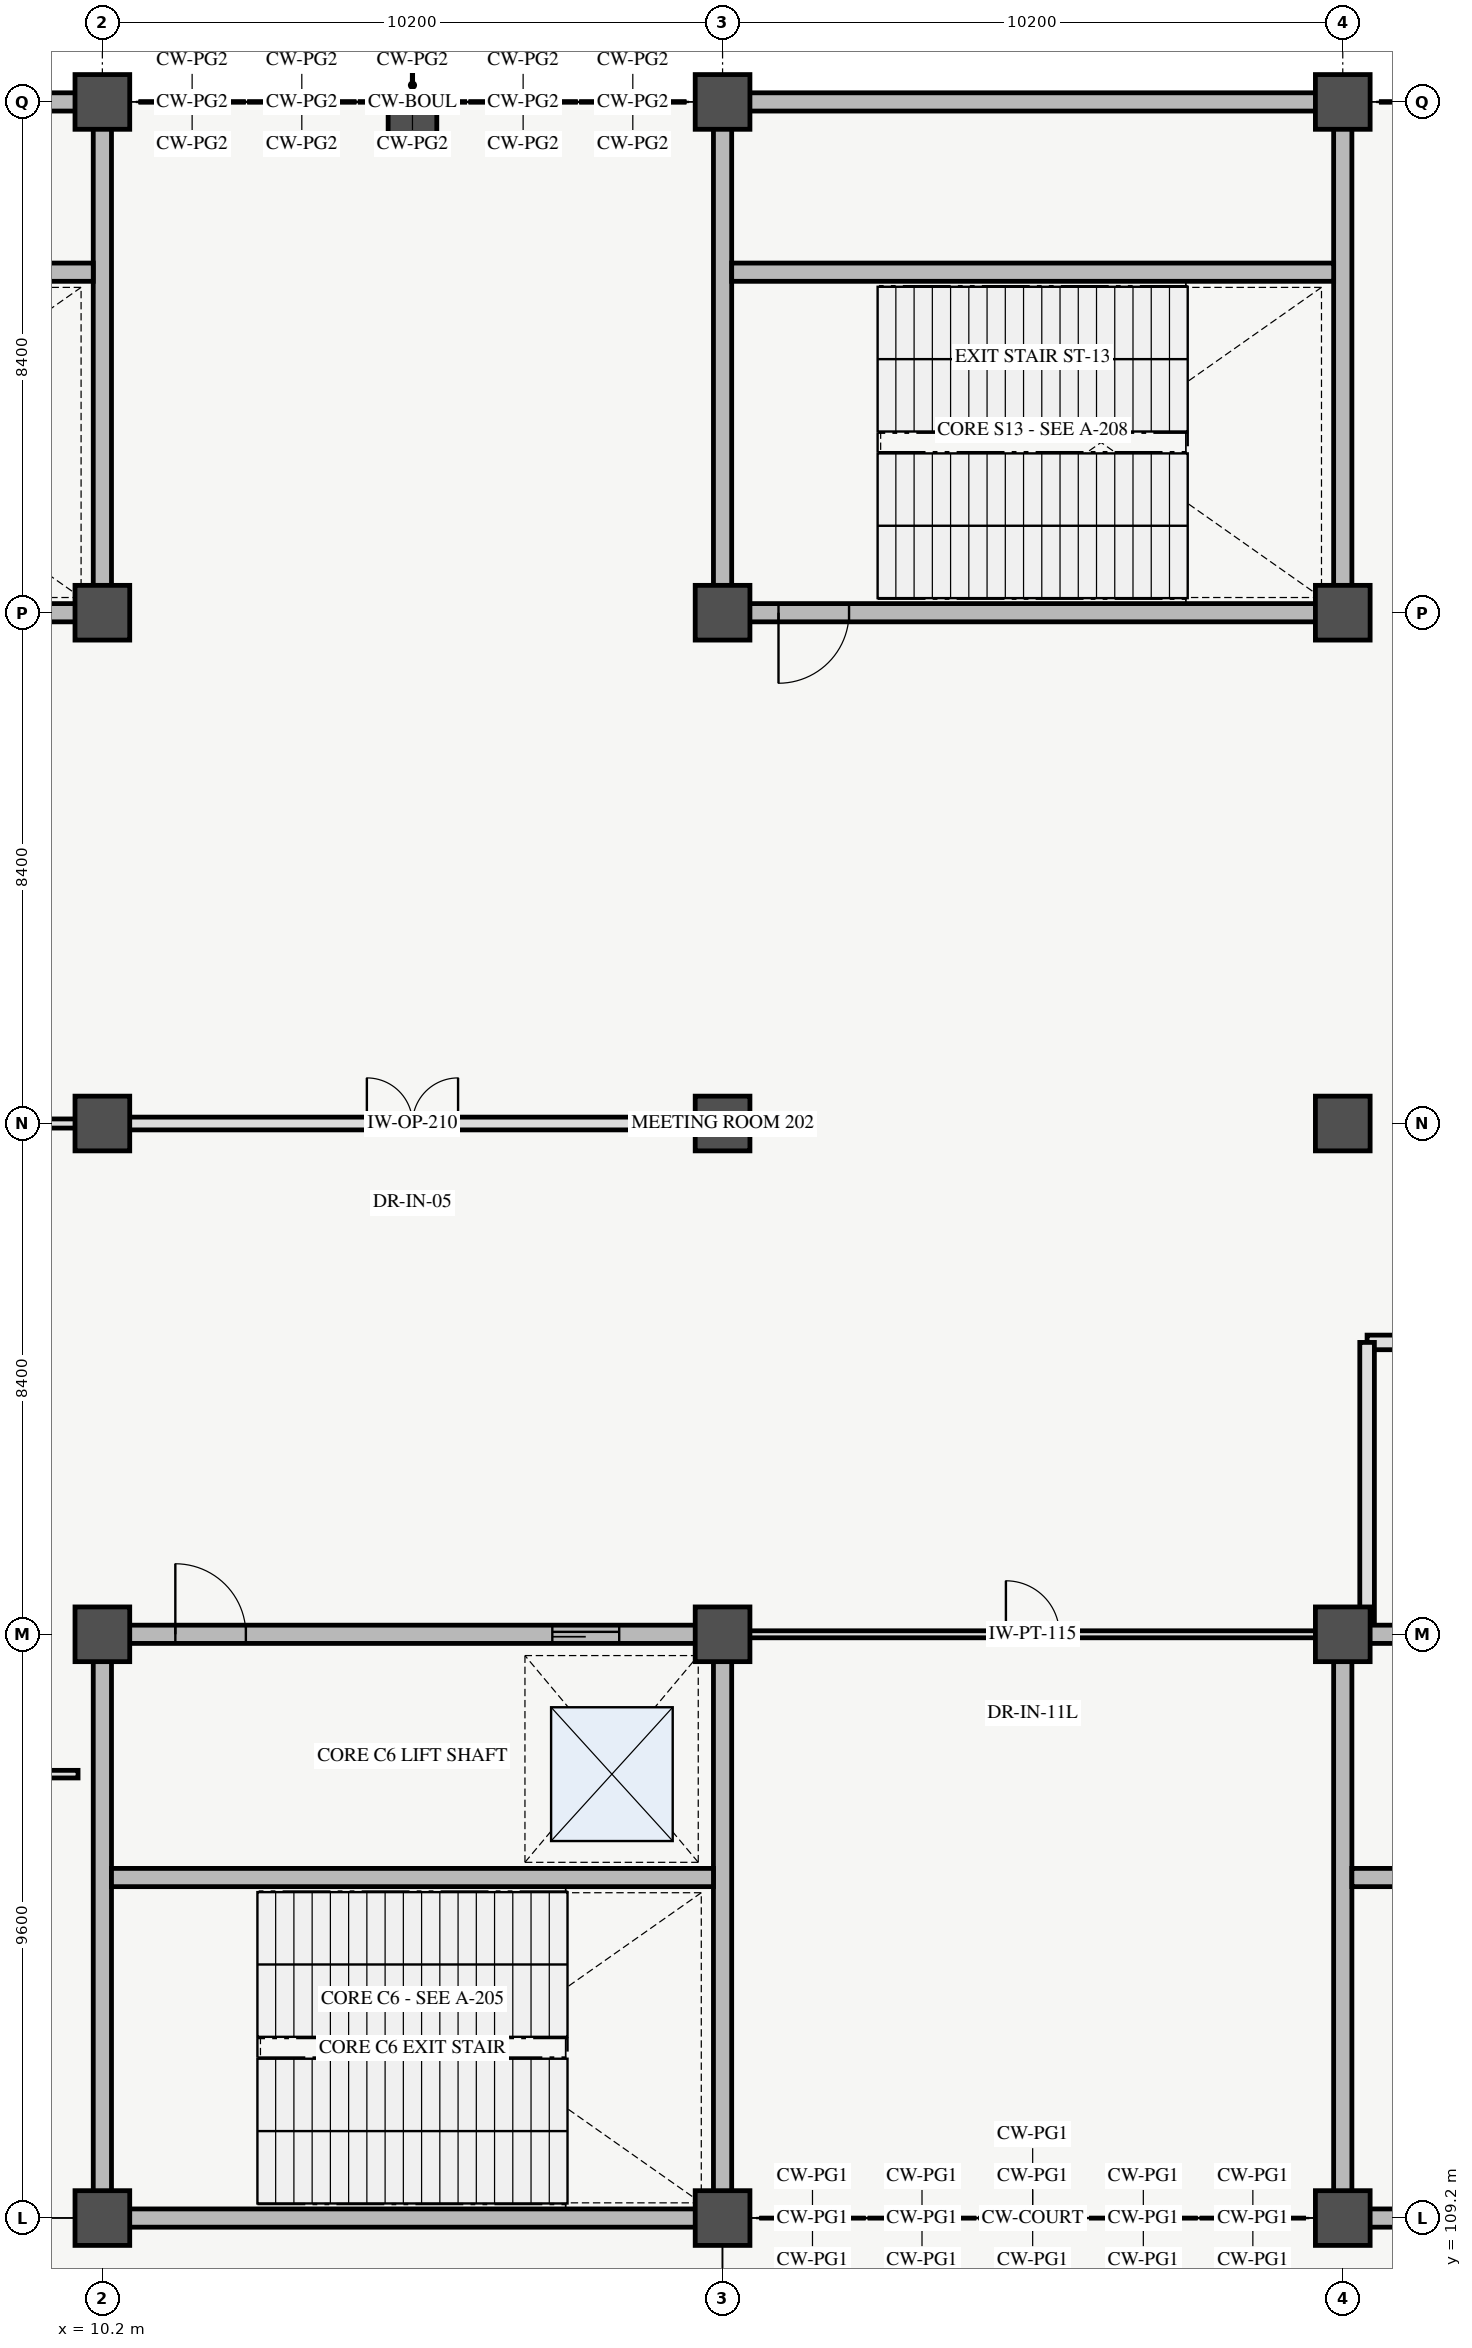
"""IFC4 building model, lengths in metres.
Left out: names, types, materials, properties, quantities, classifications, styles, units other than length and angle.
Written with IfcOpenShell. Run it as: python <this file> out.ifc"""

import sys

from ifc_helpers import new_model, si_unit, direction, frame, frame_2d, origin, origin_2d, place, context, subcontext, project, spatial, rectangle, extrude, element, fill, save


model = new_model("IFC4")
c1 = context("Model", 3, precision=1e-05, world=origin(), true_north=direction((0.0, 1.0)))
c2 = subcontext(c1, "Body", "Model", "MODEL_VIEW")
j1 = project(units=[si_unit("LENGTHUNIT", "METRE"), si_unit("PLANEANGLEUNIT", "RADIAN")], contexts=[c1])
p1 = place(None, origin())
s1 = spatial("IfcSite", under=j1, at=p1, CompositionType="ELEMENT")
p2 = place(p1, origin())
s2 = spatial("IfcBuilding", under=s1, at=p2, CompositionType="ELEMENT")
p3 = place(p2, frame((0.0, 0.0, 5.4)))
s3 = spatial("IfcBuildingStorey", under=s2, at=p3, CompositionType="ELEMENT", Elevation=5.4)
for number, where, z_axis, x_axis in (
    (1, (10.2, 109.2, 0.0), (0.0, 0.0, 1.0), (1.0, 0.0, 0.0)),
    (2, (10.2, 118.8, 0.0), (0.0, 0.0, 1.0), (1.0, 0.0, 0.0)),
    (3, (10.2, 127.2, 0.0), (0.0, 0.0, 1.0), (1.0, 0.0, 0.0)),
    (4, (10.2, 135.6, 0.0), (0.0, 0.0, 1.0), (1.0, 0.0, 0.0)),
    (5, (10.2, 144.0, 0.0), (0.0, 0.0, 1.0), (1.0, 0.0, 0.0)),
    (6, (20.4, 109.2, 0.0), (0.0, 0.0, 1.0), (1.0, 0.0, 0.0)),
    (7, (20.4, 118.8, 0.0), (0.0, 0.0, 1.0), (1.0, 0.0, 0.0)),
    (8, (20.4, 127.2, 0.0), (0.0, 0.0, 1.0), (1.0, 0.0, 0.0)),
    (9, (20.4, 135.6, 0.0), (0.0, 0.0, 1.0), (1.0, 0.0, 0.0)),
    (10, (20.4, 144.0, 0.0), (0.0, 0.0, 1.0), (1.0, 0.0, 0.0)),
    (11, (30.6, 109.2, 0.0), (0.0, 0.0, 1.0), (1.0, 0.0, 0.0)),
    (12, (30.6, 118.8, 0.0), (0.0, 0.0, 1.0), (1.0, 0.0, 0.0)),
    (13, (30.6, 127.2, 0.0), (0.0, 0.0, 1.0), (1.0, 0.0, 0.0)),
    (14, (30.6, 135.6, 0.0), (0.0, 0.0, 1.0), (1.0, 0.0, 0.0)),
    (15, (30.6, 144.0, 0.0), (0.0, 0.0, 1.0), (1.0, 0.0, 0.0)),
):
    element("IfcColumn", number, at=place(p3, frame(where, z_axis=z_axis, x_axis=x_axis)), inside=s3, PredefinedType="COLUMN", context=c2, shape_type="SweptSolid", body=[
        extrude(rectangle(XDim=0.9, YDim=0.9, at=origin_2d()), origin(), (0.0, 0.0, 1.0), 5.4),
    ])
p4 = place(p3, frame((15.3, 143.7, 0.0), z_axis=(0.0, 0.0, 1.0), x_axis=(1.0, 0.0, 0.0)))
e16 = element("IfcColumn", 16, at=p4, inside=s3, PredefinedType="PILASTER", context=c2, shape_type="SweptSolid", body=[
    extrude(rectangle(XDim=0.8, YDim=0.5, at=origin_2d()), origin(), (0.0, 0.0, 1.0), 5.4),
])
p5 = place(p3, frame((10.2, 109.2, 0.0), z_axis=(0.0, 0.0, 1.0), x_axis=(1.0, 0.0, 0.0)))
e17 = element("IfcWall", 17, at=p5, inside=s3, PredefinedType="SHEAR", context=c2, shape_type="SweptSolid", body=[
    extrude(rectangle(XDim=10.2, YDim=0.3, at=frame_2d((5.1, 0.0))), origin(), (0.0, 0.0, 1.0), 5.4),
])
p6 = place(p3, frame((10.2, 118.8, 0.0), z_axis=(0.0, 0.0, 1.0), x_axis=(1.0, 0.0, 0.0)))
e18 = element("IfcWall", 18, at=p6, inside=s3, PredefinedType="SHEAR", context=c2, shape_type="SweptSolid", body=[
    extrude(rectangle(XDim=10.2, YDim=0.3, at=frame_2d((5.1, 0.0))), origin(), (0.0, 0.0, 1.0), 5.4),
])
p7 = place(p6, frame((1.2, 0.0, 0.0)))
e19 = element("IfcOpeningElement", 19, at=p7, cuts=e18, PredefinedType="OPENING", context=c2, shape_type="SweptSolid", body=[
    extrude(rectangle(XDim=1.16, YDim=2.2, at=frame_2d((0.58, 1.1))), frame((0.0, 0.16, 0.0), z_axis=(0.0, -1.0, 0.0), x_axis=(1.0, 0.0, 0.0)), (0.0, 0.0, 1.0), 0.32),
])
p8 = place(p6, frame((7.4, 0.0, 0.0)))
e20 = element("IfcOpeningElement", 20, at=p8, cuts=e18, PredefinedType="OPENING", context=c2, shape_type="SweptSolid", body=[
    extrude(rectangle(XDim=1.1, YDim=2.2, at=frame_2d((0.55, 1.1))), frame((0.0, 0.16, 0.0), z_axis=(0.0, -1.0, 0.0), x_axis=(1.0, 0.0, 0.0)), (0.0, 0.0, 1.0), 0.32),
])
for number, where, z_axis, x_axis in (
    (21, (10.2, 109.2, 0.0), (0.0, 0.0, 1.0), (0.0, 1.0, 0.0)),
    (22, (20.4, 109.2, 0.0), (0.0, 0.0, 1.0), (0.0, 1.0, 0.0)),
):
    element("IfcWall", number, at=place(p3, frame(where, z_axis=z_axis, x_axis=x_axis)), inside=s3, PredefinedType="SHEAR", context=c2, shape_type="SweptSolid", body=[
        extrude(rectangle(XDim=9.6, YDim=0.3, at=frame_2d((4.8, 0.0))), origin(), (0.0, 0.0, 1.0), 5.4),
    ])
p9 = place(p3, frame((30.6, 109.2, 0.0), z_axis=(0.0, 0.0, 1.0), x_axis=(1.0, 0.0, 0.0)))
e23 = element("IfcWall", 23, at=p9, inside=s3, PredefinedType="SHEAR", context=c2, shape_type="SweptSolid", body=[
    extrude(rectangle(XDim=10.2, YDim=0.3, at=frame_2d((5.1, 0.0))), origin(), (0.0, 0.0, 1.0), 5.4),
])
p10 = place(p3, frame((30.6, 118.8, 0.0), z_axis=(0.0, 0.0, 1.0), x_axis=(1.0, 0.0, 0.0)))
e24 = element("IfcWall", 24, at=p10, inside=s3, PredefinedType="SHEAR", context=c2, shape_type="SweptSolid", body=[
    extrude(rectangle(XDim=10.2, YDim=0.3, at=frame_2d((5.1, 0.0))), origin(), (0.0, 0.0, 1.0), 5.4),
])
p11 = place(p10, frame((1.2, 0.0, 0.0)))
e25 = element("IfcOpeningElement", 25, at=p11, cuts=e24, PredefinedType="OPENING", context=c2, shape_type="SweptSolid", body=[
    extrude(rectangle(XDim=1.16, YDim=2.2, at=frame_2d((0.58, 1.1))), frame((0.0, 0.16, 0.0), z_axis=(0.0, -1.0, 0.0), x_axis=(1.0, 0.0, 0.0)), (0.0, 0.0, 1.0), 0.32),
])
p12 = place(p10, frame((7.4, 0.0, 0.0)))
e26 = element("IfcOpeningElement", 26, at=p12, cuts=e24, PredefinedType="OPENING", context=c2, shape_type="SweptSolid", body=[
    extrude(rectangle(XDim=1.2, YDim=2.25, at=frame_2d((0.6, 1.125))), frame((0.0, 0.16, 0.0), z_axis=(0.0, -1.0, 0.0), x_axis=(1.0, 0.0, 0.0)), (0.0, 0.0, 1.0), 0.32),
])
p13 = place(p3, frame((30.6, 109.2, 0.0), z_axis=(0.0, 0.0, 1.0), x_axis=(0.0, 1.0, 0.0)))
e27 = element("IfcWall", 27, at=p13, inside=s3, PredefinedType="SHEAR", context=c2, shape_type="SweptSolid", body=[
    extrude(rectangle(XDim=9.6, YDim=0.3, at=frame_2d((4.8, 0.0))), origin(), (0.0, 0.0, 1.0), 5.4),
])
for number, where, z_axis, x_axis in (
    (28, (10.35, 114.8, 0.0), (0.0, 0.0, 1.0), (1.0, 0.0, 0.0)),
    (29, (30.75, 114.8, 0.0), (0.0, 0.0, 1.0), (1.0, 0.0, 0.0)),
):
    element("IfcWall", number, at=place(p3, frame(where, z_axis=z_axis, x_axis=x_axis)), inside=s3, PredefinedType="SHEAR", context=c2, shape_type="SweptSolid", body=[
        extrude(rectangle(XDim=9.9, YDim=0.3, at=frame_2d((4.95, 0.0))), origin(), (0.0, 0.0, 1.0), 5.4),
    ])
p14 = place(p3, frame((20.4, 135.6, 0.0), z_axis=(0.0, 0.0, 1.0), x_axis=(1.0, 0.0, 0.0)))
e30 = element("IfcWall", 30, at=p14, inside=s3, PredefinedType="SHEAR", context=c2, shape_type="SweptSolid", body=[
    extrude(rectangle(XDim=10.2, YDim=0.3, at=frame_2d((5.1, 0.0))), origin(), (0.0, 0.0, 1.0), 5.4),
])
p15 = place(p14, frame((0.92, 0.0, 0.0)))
e31 = element("IfcOpeningElement", 31, at=p15, cuts=e30, PredefinedType="OPENING", context=c2, shape_type="SweptSolid", body=[
    extrude(rectangle(XDim=1.16, YDim=2.2, at=frame_2d((0.58, 1.1))), frame((0.0, 0.16, 0.0), z_axis=(0.0, -1.0, 0.0), x_axis=(1.0, 0.0, 0.0)), (0.0, 0.0, 1.0), 0.32),
])
p16 = place(p3, frame((20.4, 144.0, 0.0), z_axis=(0.0, 0.0, 1.0), x_axis=(1.0, 0.0, 0.0)))
e32 = element("IfcWall", 32, at=p16, inside=s3, PredefinedType="SHEAR", context=c2, shape_type="SweptSolid", body=[
    extrude(rectangle(XDim=10.2, YDim=0.3, at=frame_2d((5.1, 0.0))), origin(), (0.0, 0.0, 1.0), 5.4),
])
for number, where, z_axis, x_axis in (
    (33, (20.4, 135.6, 0.0), (0.0, 0.0, 1.0), (0.0, 1.0, 0.0)),
    (34, (30.6, 135.6, 0.0), (0.0, 0.0, 1.0), (0.0, 1.0, 0.0)),
):
    element("IfcWall", number, at=place(p3, frame(where, z_axis=z_axis, x_axis=x_axis)), inside=s3, PredefinedType="SHEAR", context=c2, shape_type="SweptSolid", body=[
        extrude(rectangle(XDim=8.4, YDim=0.3, at=frame_2d((4.2, 0.0))), origin(), (0.0, 0.0, 1.0), 5.4),
    ])
p17 = place(p3, frame((20.55, 141.2, 0.0), z_axis=(0.0, 0.0, 1.0), x_axis=(1.0, 0.0, 0.0)))
e35 = element("IfcWall", 35, at=p17, inside=s3, PredefinedType="SHEAR", context=c2, shape_type="SweptSolid", body=[
    extrude(rectangle(XDim=9.9, YDim=0.3, at=frame_2d((4.95, 0.0))), origin(), (0.0, 0.0, 1.0), 5.4),
])
p18 = place(p3, frame((0.0, 135.6, 0.0), z_axis=(0.0, 0.0, 1.0), x_axis=(1.0, 0.0, 0.0)))
e36 = element("IfcWall", 36, at=p18, inside=s3, PredefinedType="SHEAR", context=c2, shape_type="SweptSolid", body=[
    extrude(rectangle(XDim=10.2, YDim=0.3, at=frame_2d((5.1, 0.0))), origin(), (0.0, 0.0, 1.0), 5.4),
])
p19 = place(p18, frame((0.92, 0.0, 0.0)))
e37 = element("IfcOpeningElement", 37, at=p19, cuts=e36, PredefinedType="OPENING", context=c2, shape_type="SweptSolid", body=[
    extrude(rectangle(XDim=1.16, YDim=2.2, at=frame_2d((0.58, 1.1))), frame((0.0, 0.16, 0.0), z_axis=(0.0, -1.0, 0.0), x_axis=(1.0, 0.0, 0.0)), (0.0, 0.0, 1.0), 0.32),
])
p20 = place(p3, frame((0.0, 144.0, 0.0), z_axis=(0.0, 0.0, 1.0), x_axis=(1.0, 0.0, 0.0)))
e38 = element("IfcWall", 38, at=p20, inside=s3, PredefinedType="SHEAR", context=c2, shape_type="SweptSolid", body=[
    extrude(rectangle(XDim=10.2, YDim=0.3, at=frame_2d((5.1, 0.0))), origin(), (0.0, 0.0, 1.0), 5.4),
])
p21 = place(p3, frame((10.2, 135.6, 0.0), z_axis=(0.0, 0.0, 1.0), x_axis=(0.0, 1.0, 0.0)))
e39 = element("IfcWall", 39, at=p21, inside=s3, PredefinedType="SHEAR", context=c2, shape_type="SweptSolid", body=[
    extrude(rectangle(XDim=8.4, YDim=0.3, at=frame_2d((4.2, 0.0))), origin(), (0.0, 0.0, 1.0), 5.4),
])
p22 = place(p3, frame((0.15, 141.2, 0.0), z_axis=(0.0, 0.0, 1.0), x_axis=(1.0, 0.0, 0.0)))
e40 = element("IfcWall", 40, at=p22, inside=s3, PredefinedType="SHEAR", context=c2, shape_type="SweptSolid", body=[
    extrude(rectangle(XDim=9.9, YDim=0.3, at=frame_2d((4.95, 0.0))), origin(), (0.0, 0.0, 1.0), 5.4),
])
p23 = place(p3, frame((31.0, 123.6, 0.0), z_axis=(0.0, 0.0, 1.0), x_axis=(1.0, 0.0, 0.0)))
e41 = element("IfcWall", 41, at=p23, inside=s3, PredefinedType="PARTITIONING", context=c2, shape_type="SweptSolid", body=[
    extrude(rectangle(XDim=9.4, YDim=0.24, at=frame_2d((4.7, 0.0))), origin(), (0.0, 0.0, 1.0), 4.2),
])
p24 = place(p23, frame((3.75, 0.0, 0.0)))
e42 = element("IfcOpeningElement", 42, at=p24, cuts=e41, PredefinedType="OPENING", context=c2, shape_type="SweptSolid", body=[
    extrude(rectangle(XDim=1.9, YDim=2.25, at=frame_2d((0.95, 1.125))), frame((0.0, 0.13, 0.0), z_axis=(0.0, -1.0, 0.0), x_axis=(1.0, 0.0, 0.0)), (0.0, 0.0, 1.0), 0.26),
])
p25 = place(p3, frame((31.0, 119.0, 0.0), z_axis=(0.0, 0.0, 1.0), x_axis=(0.0, 1.0, 0.0)))
e43 = element("IfcWall", 43, at=p25, inside=s3, PredefinedType="PARTITIONING", context=c2, shape_type="SweptSolid", body=[
    extrude(rectangle(XDim=4.6, YDim=0.24, at=frame_2d((2.3, 0.0))), origin(), (0.0, 0.0, 1.0), 4.2),
])
p26 = place(p3, frame((0.4, 127.2, 0.0), z_axis=(0.0, 0.0, 1.0), x_axis=(1.0, 0.0, 0.0)))
e44 = element("IfcWall", 44, at=p26, inside=s3, PredefinedType="MOVABLE", context=c2, shape_type="SweptSolid", body=[
    extrude(rectangle(XDim=9.4, YDim=0.15, at=frame_2d((4.7, 0.0))), origin(), (0.0, 0.0, 1.0), 4.2),
])
p27 = place(p26, frame((3.625, 0.0, 0.0)))
e45 = element("IfcOpeningElement", 45, at=p27, cuts=e44, PredefinedType="OPENING", context=c2, shape_type="SweptSolid", body=[
    extrude(rectangle(XDim=2.15, YDim=2.38, at=frame_2d((1.075, 1.19))), frame((0.0, 0.085, 0.0), z_axis=(0.0, -1.0, 0.0), x_axis=(1.0, 0.0, 0.0)), (0.0, 0.0, 1.0), 0.17),
])
p28 = place(p3, frame((10.6, 127.2, 0.0), z_axis=(0.0, 0.0, 1.0), x_axis=(1.0, 0.0, 0.0)))
e46 = element("IfcWall", 46, at=p28, inside=s3, PredefinedType="MOVABLE", context=c2, shape_type="SweptSolid", body=[
    extrude(rectangle(XDim=9.4, YDim=0.21, at=frame_2d((4.7, 0.0))), origin(), (0.0, 0.0, 1.0), 4.2),
])
p29 = place(p28, frame((3.95, 0.0, 0.0)))
e47 = element("IfcOpeningElement", 47, at=p29, cuts=e46, PredefinedType="OPENING", context=c2, shape_type="SweptSolid", body=[
    extrude(rectangle(XDim=1.5, YDim=2.25, at=frame_2d((0.75, 1.125))), frame((0.0, 0.115, 0.0), z_axis=(0.0, -1.0, 0.0), x_axis=(1.0, 0.0, 0.0)), (0.0, 0.0, 1.0), 0.23),
])
p30 = place(p3, frame((0.4, 116.5, 0.0), z_axis=(0.0, 0.0, 1.0), x_axis=(1.0, 0.0, 0.0)))
e48 = element("IfcWall", 48, at=p30, inside=s3, PredefinedType="PARTITIONING", context=c2, shape_type="SweptSolid", body=[
    extrude(rectangle(XDim=9.4, YDim=0.125, at=frame_2d((4.7, 0.0))), origin(), (0.0, 0.0, 1.0), 4.2),
])
p31 = place(p30, frame((4.08, 0.0, 0.0)))
e49 = element("IfcOpeningElement", 49, at=p31, cuts=e48, PredefinedType="OPENING", context=c2, shape_type="SweptSolid", body=[
    extrude(rectangle(XDim=1.24, YDim=2.2, at=frame_2d((0.62, 1.1))), frame((0.0, 0.073, 0.0), z_axis=(0.0, -1.0, 0.0), x_axis=(1.0, 0.0, 0.0)), (0.0, 0.0, 1.0), 0.145),
])
p32 = place(p3, frame((20.8, 118.8, 0.0), z_axis=(0.0, 0.0, 1.0), x_axis=(1.0, 0.0, 0.0)))
e50 = element("IfcWall", 50, at=p32, inside=s3, PredefinedType="PARTITIONING", context=c2, shape_type="SweptSolid", body=[
    extrude(rectangle(XDim=9.4, YDim=0.115, at=frame_2d((4.7, 0.0))), origin(), (0.0, 0.0, 1.0), 4.2),
])
p33 = place(p32, frame((4.26, 0.0, 0.0)))
e51 = element("IfcOpeningElement", 51, at=p33, cuts=e50, PredefinedType="OPENING", context=c2, shape_type="SweptSolid", body=[
    extrude(rectangle(XDim=0.88, YDim=2.08, at=frame_2d((0.44, 1.04))), frame((0.0, 0.067, 0.0), z_axis=(0.0, -1.0, 0.0), x_axis=(1.0, 0.0, 0.0)), (0.0, 0.0, 1.0), 0.135),
])
p34 = place(p7, origin())
e52 = element("IfcDoor", 52, at=p34, inside=s3, OperationType="SINGLE_SWING_LEFT", PredefinedType="DOOR", context=c2, shape_type="SweptSolid", body=[
    extrude(rectangle(XDim=1.16, YDim=2.2, at=frame_2d((0.58, 1.1))), frame((0.0, 0.025, 0.0), z_axis=(0.0, -1.0, 0.0), x_axis=(1.0, 0.0, 0.0)), (0.0, 0.0, 1.0), 0.05),
])
fill(e19, e52)
p35 = place(p8, origin())
e53 = element("IfcDoor", 53, at=p35, inside=s3, OperationType="SLIDING_TO_RIGHT", PredefinedType="DOOR", context=c2, shape_type="SweptSolid", body=[
    extrude(rectangle(XDim=1.1, YDim=2.2, at=frame_2d((0.55, 1.1))), frame((0.0, 0.025, 0.0), z_axis=(0.0, -1.0, 0.0), x_axis=(1.0, 0.0, 0.0)), (0.0, 0.0, 1.0), 0.05),
])
fill(e20, e53)
p36 = place(p15, origin())
e54 = element("IfcDoor", 54, at=p36, inside=s3, OperationType="SINGLE_SWING_LEFT", PredefinedType="DOOR", context=c2, shape_type="SweptSolid", body=[
    extrude(rectangle(XDim=1.16, YDim=2.2, at=frame_2d((0.58, 1.1))), frame((0.0, 0.025, 0.0), z_axis=(0.0, -1.0, 0.0), x_axis=(1.0, 0.0, 0.0)), (0.0, 0.0, 1.0), 0.05),
])
fill(e31, e54)
p37 = place(p29, origin())
e55 = element("IfcDoor", 55, at=p37, inside=s3, OperationType="DOUBLE_DOOR_SINGLE_SWING", PredefinedType="DOOR", context=c2, shape_type="SweptSolid", body=[
    extrude(rectangle(XDim=1.5, YDim=2.25, at=frame_2d((0.75, 1.125))), frame((0.0, 0.025, 0.0), z_axis=(0.0, -1.0, 0.0), x_axis=(1.0, 0.0, 0.0)), (0.0, 0.0, 1.0), 0.05),
])
fill(e47, e55)
p38 = place(p33, origin())
e56 = element("IfcDoor", 56, at=p38, inside=s3, OperationType="SINGLE_SWING_LEFT", PredefinedType="DOOR", context=c2, shape_type="SweptSolid", body=[
    extrude(rectangle(XDim=0.88, YDim=2.08, at=frame_2d((0.44, 1.04))), frame((0.0, 0.025, 0.0), z_axis=(0.0, -1.0, 0.0), x_axis=(1.0, 0.0, 0.0)), (0.0, 0.0, 1.0), 0.05),
])
fill(e51, e56)
save(model, sys.argv[1])
